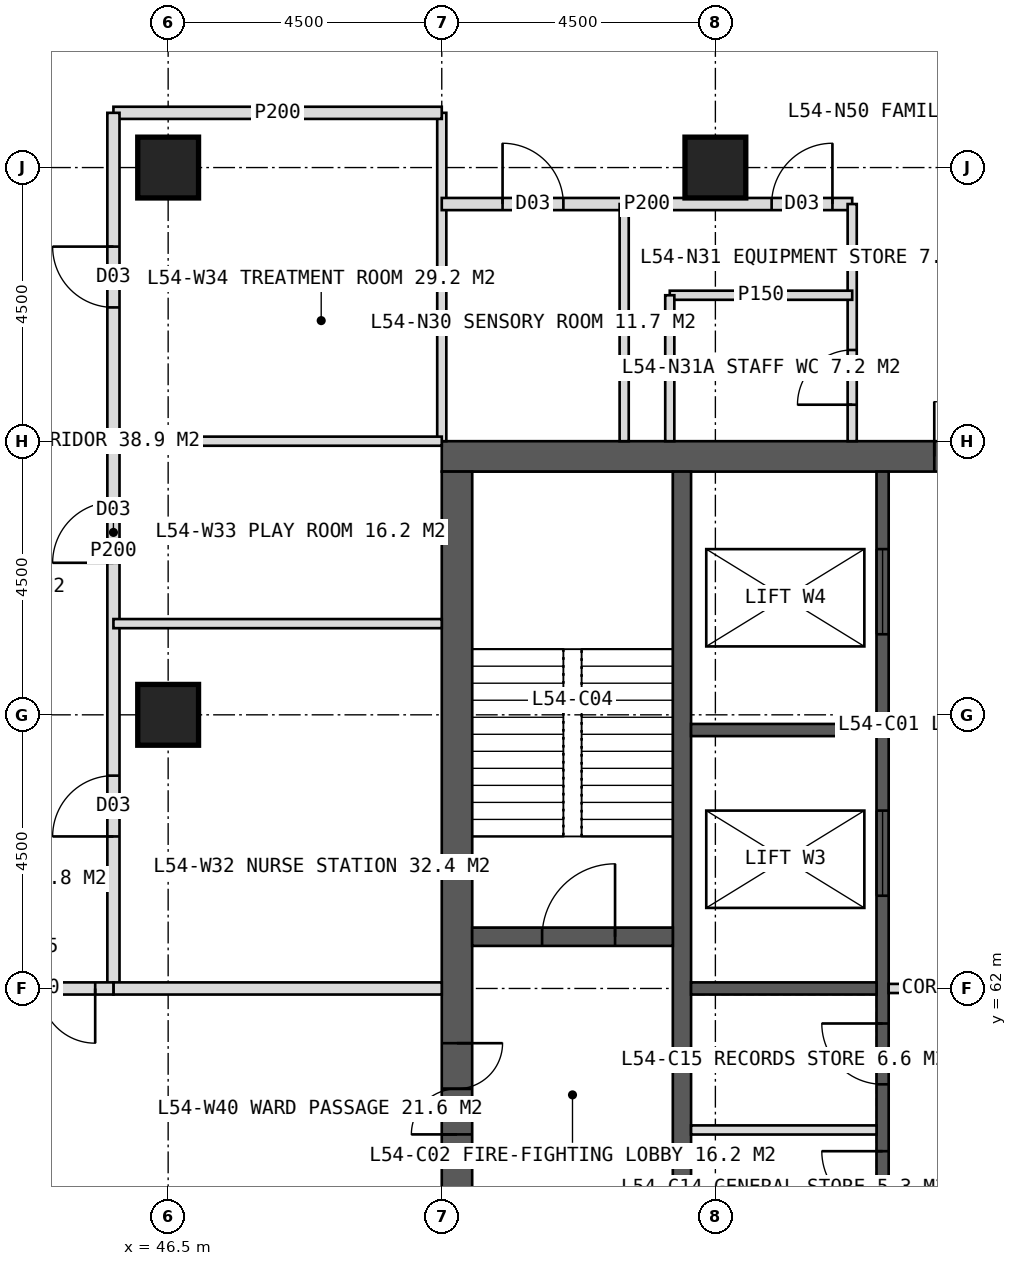
"""IFC4 building model, lengths in metres.
Left out: names, types, materials, properties, quantities, classifications, styles, units other than length and angle.
Written with IfcOpenShell. Run it as: python <this file> out.ifc"""

import sys

from ifc_helpers import new_model, si_unit, direction, frame, frame_2d, origin, origin_2d, place, context, subcontext, project, spatial, rectangle, hollow_rectangle, extrude, element, fill, save


model = new_model("IFC4")
c1 = context("Model", 3, precision=1e-05, world=origin(), true_north=direction((0.0, 1.0)))
c2 = subcontext(c1, "Body", "Model", "MODEL_VIEW")
j1 = project(units=[si_unit("LENGTHUNIT", "METRE"), si_unit("PLANEANGLEUNIT", "RADIAN")], contexts=[c1])
p1 = place(None, origin())
s1 = spatial("IfcSite", under=j1, at=p1, CompositionType="ELEMENT")
p2 = place(p1, origin())
s2 = spatial("IfcBuilding", under=s1, at=p2, CompositionType="ELEMENT")
p3 = place(p2, frame((0.0, 0.0, 225.0)))
s3 = spatial("IfcBuildingStorey", under=s2, at=p3, CompositionType="ELEMENT", Elevation=225.0)
p4 = place(p3, frame((51.0, 70.75, 0.0), z_axis=(0.0, 0.0, 1.0), x_axis=(1.0, 0.0, 0.0)))
e1 = element("IfcWall", 1, at=p4, inside=s3, PredefinedType="SHEAR", context=c2, shape_type="SweptSolid", body=[
    extrude(rectangle(XDim=18.0, YDim=0.5, at=frame_2d((9.0, 0.0))), origin(), (0.0, 0.0, 1.0), 4.0),
])
p5 = place(p4, frame((8.1, 0.0, 0.0)))
e2 = element("IfcOpeningElement", 2, at=p5, cuts=e1, PredefinedType="OPENING", context=c2, shape_type="SweptSolid", body=[
    extrude(rectangle(XDim=1.8, YDim=2.2, at=frame_2d((0.9, 1.1))), frame((0.0, 0.26, 0.0), z_axis=(0.0, -1.0, 0.0), x_axis=(1.0, 0.0, 0.0)), (0.0, 0.0, 1.0), 0.52),
])
p6 = place(p3, frame((51.25, 53.5, 0.0), z_axis=(0.0, 0.0, 1.0), x_axis=(0.0, 1.0, 0.0)))
e3 = element("IfcWall", 3, at=p6, inside=s3, PredefinedType="SHEAR", context=c2, shape_type="SweptSolid", body=[
    extrude(rectangle(XDim=17.0, YDim=0.5, at=frame_2d((8.5, 0.0))), origin(), (0.0, 0.0, 1.0), 4.0),
])
p7 = place(p6, frame((6.1, 0.0, 0.0)))
e4 = element("IfcOpeningElement", 4, at=p7, cuts=e3, PredefinedType="OPENING", context=c2, shape_type="SweptSolid", body=[
    extrude(rectangle(XDim=1.5, YDim=2.2, at=frame_2d((0.75, 1.1))), frame((0.0, 0.26, 0.0), z_axis=(0.0, -1.0, 0.0), x_axis=(1.0, 0.0, 0.0)), (0.0, 0.0, 1.0), 0.52),
])
p8 = place(p3, frame((54.95, 53.5, 0.0), z_axis=(0.0, 0.0, 1.0), x_axis=(0.0, 1.0, 0.0)))
e5 = element("IfcWall", 5, at=p8, inside=s3, PredefinedType="SHEAR", context=c2, shape_type="SweptSolid", body=[
    extrude(rectangle(XDim=17.0, YDim=0.3, at=frame_2d((8.5, 0.0))), origin(), (0.0, 0.0, 1.0), 4.0),
])
p9 = place(p3, frame((58.25, 53.5, 0.0), z_axis=(0.0, 0.0, 1.0), x_axis=(0.0, 1.0, 0.0)))
e6 = element("IfcWall", 6, at=p9, inside=s3, PredefinedType="SHEAR", context=c2, shape_type="SweptSolid", body=[
    extrude(rectangle(XDim=17.0, YDim=0.2, at=frame_2d((8.5, 0.0))), origin(), (0.0, 0.0, 1.0), 4.0),
])
p10 = place(p9, frame((0.6, 0.0, 0.0)))
e7 = element("IfcOpeningElement", 7, at=p10, cuts=e6, PredefinedType="OPENING", context=c2, shape_type="SweptSolid", body=[
    extrude(rectangle(XDim=1.0, YDim=2.1, at=frame_2d((0.5, 1.05))), frame((0.0, 0.11, 0.0), z_axis=(0.0, -1.0, 0.0), x_axis=(1.0, 0.0, 0.0)), (0.0, 0.0, 1.0), 0.22),
])
p11 = place(p9, frame((2.75, 0.0, 0.0)))
e8 = element("IfcOpeningElement", 8, at=p11, cuts=e6, PredefinedType="OPENING", context=c2, shape_type="SweptSolid", body=[
    extrude(rectangle(XDim=1.0, YDim=2.1, at=frame_2d((0.5, 1.05))), frame((0.0, 0.11, 0.0), z_axis=(0.0, -1.0, 0.0), x_axis=(1.0, 0.0, 0.0)), (0.0, 0.0, 1.0), 0.22),
])
p12 = place(p9, frame((4.824, 0.0, 0.0)))
e9 = element("IfcOpeningElement", 9, at=p12, cuts=e6, PredefinedType="OPENING", context=c2, shape_type="SweptSolid", body=[
    extrude(rectangle(XDim=1.0, YDim=2.1, at=frame_2d((0.5, 1.05))), frame((0.0, 0.11, 0.0), z_axis=(0.0, -1.0, 0.0), x_axis=(1.0, 0.0, 0.0)), (0.0, 0.0, 1.0), 0.22),
])
p13 = place(p9, frame((6.924, 0.0, 0.0)))
e10 = element("IfcOpeningElement", 10, at=p13, cuts=e6, PredefinedType="OPENING", context=c2, shape_type="SweptSolid", body=[
    extrude(rectangle(XDim=1.0, YDim=2.1, at=frame_2d((0.5, 1.05))), frame((0.0, 0.11, 0.0), z_axis=(0.0, -1.0, 0.0), x_axis=(1.0, 0.0, 0.0)), (0.0, 0.0, 1.0), 0.22),
])
p14 = place(p9, frame((10.025, 0.0, 0.0)))
e11 = element("IfcOpeningElement", 11, at=p14, cuts=e6, PredefinedType="OPENING", context=c2, shape_type="SweptSolid", body=[
    extrude(rectangle(XDim=1.4, YDim=2.2, at=frame_2d((0.7, 1.1))), frame((0.0, 0.11, 0.0), z_axis=(0.0, -1.0, 0.0), x_axis=(1.0, 0.0, 0.0)), (0.0, 0.0, 1.0), 0.22),
])
p15 = place(p9, frame((14.325, 0.0, 0.0)))
e12 = element("IfcOpeningElement", 12, at=p15, cuts=e6, PredefinedType="OPENING", context=c2, shape_type="SweptSolid", body=[
    extrude(rectangle(XDim=1.4, YDim=2.2, at=frame_2d((0.7, 1.1))), frame((0.0, 0.11, 0.0), z_axis=(0.0, -1.0, 0.0), x_axis=(1.0, 0.0, 0.0)), (0.0, 0.0, 1.0), 0.22),
])
for number, where, z_axis, x_axis in (
    (13, (55.1, 62.0, 0.0), (0.0, 0.0, 1.0), (1.0, 0.0, 0.0)),
    (14, (55.1, 66.25, 0.0), (0.0, 0.0, 1.0), (1.0, 0.0, 0.0)),
):
    element("IfcWall", number, at=place(p3, frame(where, z_axis=z_axis, x_axis=x_axis)), inside=s3, PredefinedType="SHEAR", context=c2, shape_type="SweptSolid", body=[
        extrude(rectangle(XDim=3.05, YDim=0.2, at=frame_2d((1.525, 0.0))), origin(), (0.0, 0.0, 1.0), 4.0),
    ])
p16 = place(p3, frame((51.5, 62.85, 0.0), z_axis=(0.0, 0.0, 1.0), x_axis=(1.0, 0.0, 0.0)))
e15 = element("IfcWall", 15, at=p16, inside=s3, PredefinedType="SHEAR", context=c2, shape_type="SweptSolid", body=[
    extrude(rectangle(XDim=3.3, YDim=0.3, at=frame_2d((1.65, 0.0))), origin(), (0.0, 0.0, 1.0), 4.0),
])
p17 = place(p16, frame((1.15, 0.0, 0.0)))
e16 = element("IfcOpeningElement", 16, at=p17, cuts=e15, PredefinedType="OPENING", context=c2, shape_type="SweptSolid", body=[
    extrude(rectangle(XDim=1.2, YDim=2.1, at=frame_2d((0.6, 1.05))), frame((0.0, 0.16, 0.0), z_axis=(0.0, -1.0, 0.0), x_axis=(1.0, 0.0, 0.0)), (0.0, 0.0, 1.0), 0.32),
])
for number, where, z_axis, x_axis in (
    (17, (46.5, 75.5, 0.0), (0.0, 0.0, 1.0), (1.0, 0.0, 0.0)),
    (18, (55.5, 75.5, 0.0), (0.0, 0.0, 1.0), (1.0, 0.0, 0.0)),
    (19, (46.5, 66.5, 0.0), (0.0, 0.0, 1.0), (1.0, 0.0, 0.0)),
):
    element("IfcColumn", number, at=place(p3, frame(where, z_axis=z_axis, x_axis=x_axis)), inside=s3, PredefinedType="COLUMN", context=c2, shape_type="SweptSolid", body=[
        extrude(hollow_rectangle(XDim=1.0, YDim=1.0, WallThickness=0.1, at=origin_2d()), origin(), (0.0, 0.0, 1.0), 4.0),
    ])
p18 = place(p3, frame((51.0, 71.0, 0.0), z_axis=(0.0, 0.0, 1.0), x_axis=(0.0, 1.0, 0.0)))
e20 = element("IfcWall", 20, at=p18, inside=s3, PredefinedType="PARTITIONING", context=c2, shape_type="SweptSolid", body=[
    extrude(rectangle(XDim=5.4, YDim=0.15, at=frame_2d((2.7, 0.0))), origin(), (0.0, 0.0, 1.0), 3.75),
])
p19 = place(p3, frame((45.6, 76.4, 0.0), z_axis=(0.0, 0.0, 1.0), x_axis=(1.0, 0.0, 0.0)))
e21 = element("IfcWall", 21, at=p19, inside=s3, PredefinedType="PARTITIONING", context=c2, shape_type="SweptSolid", body=[
    extrude(rectangle(XDim=5.4, YDim=0.2, at=frame_2d((2.7, 0.0))), origin(), (0.0, 0.0, 1.0), 3.75),
])
p20 = place(p3, frame((51.0, 74.9, 0.0), z_axis=(0.0, 0.0, 1.0), x_axis=(1.0, 0.0, 0.0)))
e22 = element("IfcWall", 22, at=p20, inside=s3, PredefinedType="PARTITIONING", context=c2, shape_type="SweptSolid", body=[
    extrude(rectangle(XDim=6.75, YDim=0.2, at=frame_2d((3.375, 0.0))), origin(), (0.0, 0.0, 1.0), 3.75),
])
p21 = place(p20, frame((1.0, 0.0, 0.0)))
e23 = element("IfcOpeningElement", 23, at=p21, cuts=e22, PredefinedType="OPENING", context=c2, shape_type="SweptSolid", body=[
    extrude(rectangle(XDim=1.0, YDim=2.1, at=frame_2d((0.5, 1.05))), frame((0.0, 0.11, 0.0), z_axis=(0.0, -1.0, 0.0), x_axis=(1.0, 0.0, 0.0)), (0.0, 0.0, 1.0), 0.22),
])
p22 = place(p20, frame((5.425, 0.0, 0.0)))
e24 = element("IfcOpeningElement", 24, at=p22, cuts=e22, PredefinedType="OPENING", context=c2, shape_type="SweptSolid", body=[
    extrude(rectangle(XDim=1.0, YDim=2.1, at=frame_2d((0.5, 1.05))), frame((0.0, 0.11, 0.0), z_axis=(0.0, -1.0, 0.0), x_axis=(1.0, 0.0, 0.0)), (0.0, 0.0, 1.0), 0.22),
])
p23 = place(p3, frame((57.75, 71.0, 0.0), z_axis=(0.0, 0.0, 1.0), x_axis=(0.0, 1.0, 0.0)))
e25 = element("IfcWall", 25, at=p23, inside=s3, PredefinedType="PARTITIONING", context=c2, shape_type="SweptSolid", body=[
    extrude(rectangle(XDim=3.9, YDim=0.15, at=frame_2d((1.95, 0.0))), origin(), (0.0, 0.0, 1.0), 3.75),
])
p24 = place(p23, frame((0.6, 0.0, 0.0)))
e26 = element("IfcOpeningElement", 26, at=p24, cuts=e25, PredefinedType="OPENING", context=c2, shape_type="SweptSolid", body=[
    extrude(rectangle(XDim=0.9, YDim=2.1, at=frame_2d((0.45, 1.05))), frame((0.0, 0.085, 0.0), z_axis=(0.0, -1.0, 0.0), x_axis=(1.0, 0.0, 0.0)), (0.0, 0.0, 1.0), 0.17),
])
p25 = place(p3, frame((54.0, 71.0, 0.0), z_axis=(0.0, 0.0, 1.0), x_axis=(0.0, 1.0, 0.0)))
e27 = element("IfcWall", 27, at=p25, inside=s3, PredefinedType="PARTITIONING", context=c2, shape_type="SweptSolid", body=[
    extrude(rectangle(XDim=3.9, YDim=0.15, at=frame_2d((1.95, 0.0))), origin(), (0.0, 0.0, 1.0), 3.75),
])
p26 = place(p3, frame((54.75, 73.4, 0.0), z_axis=(0.0, 0.0, 1.0), x_axis=(1.0, 0.0, 0.0)))
e28 = element("IfcWall", 28, at=p26, inside=s3, PredefinedType="PARTITIONING", context=c2, shape_type="SweptSolid", body=[
    extrude(rectangle(XDim=3.0, YDim=0.15, at=frame_2d((1.5, 0.0))), origin(), (0.0, 0.0, 1.0), 3.75),
])
p27 = place(p3, frame((54.75, 71.0, 0.0), z_axis=(0.0, 0.0, 1.0), x_axis=(0.0, 1.0, 0.0)))
e29 = element("IfcWall", 29, at=p27, inside=s3, PredefinedType="PARTITIONING", context=c2, shape_type="SweptSolid", body=[
    extrude(rectangle(XDim=2.4, YDim=0.15, at=frame_2d((1.2, 0.0))), origin(), (0.0, 0.0, 1.0), 3.75),
])
p28 = place(p3, frame((45.6, 62.0, 0.0), z_axis=(0.0, 0.0, 1.0), x_axis=(0.0, 1.0, 0.0)))
e30 = element("IfcWall", 30, at=p28, inside=s3, PredefinedType="PARTITIONING", context=c2, shape_type="SweptSolid", body=[
    extrude(rectangle(XDim=14.4, YDim=0.2, at=frame_2d((7.2, 0.0))), origin(), (0.0, 0.0, 1.0), 3.75),
])
p29 = place(p28, frame((2.5, 0.0, 0.0)))
e31 = element("IfcOpeningElement", 31, at=p29, cuts=e30, PredefinedType="OPENING", context=c2, shape_type="SweptSolid", body=[
    extrude(rectangle(XDim=1.0, YDim=2.1, at=frame_2d((0.5, 1.05))), frame((0.0, 0.11, 0.0), z_axis=(0.0, -1.0, 0.0), x_axis=(1.0, 0.0, 0.0)), (0.0, 0.0, 1.0), 0.22),
])
p30 = place(p28, frame((7.0, 0.0, 0.0)))
e32 = element("IfcOpeningElement", 32, at=p30, cuts=e30, PredefinedType="OPENING", context=c2, shape_type="SweptSolid", body=[
    extrude(rectangle(XDim=1.0, YDim=2.1, at=frame_2d((0.5, 1.05))), frame((0.0, 0.11, 0.0), z_axis=(0.0, -1.0, 0.0), x_axis=(1.0, 0.0, 0.0)), (0.0, 0.0, 1.0), 0.22),
])
p31 = place(p28, frame((11.2, 0.0, 0.0)))
e33 = element("IfcOpeningElement", 33, at=p31, cuts=e30, PredefinedType="OPENING", context=c2, shape_type="SweptSolid", body=[
    extrude(rectangle(XDim=1.0, YDim=2.1, at=frame_2d((0.5, 1.05))), frame((0.0, 0.11, 0.0), z_axis=(0.0, -1.0, 0.0), x_axis=(1.0, 0.0, 0.0)), (0.0, 0.0, 1.0), 0.22),
])
p32 = place(p3, frame((51.0, 62.0, 0.0), z_axis=(0.0, 0.0, 1.0), x_axis=(-1.0, 0.0, 0.0)))
e34 = element("IfcWall", 34, at=p32, inside=s3, PredefinedType="SOLIDWALL", context=c2, shape_type="SweptSolid", body=[
    extrude(rectangle(XDim=5.4, YDim=0.2, at=frame_2d((2.7, 0.0))), origin(), (0.0, 0.0, 1.0), 2.95),
])
for number, where, z_axis, x_axis in (
    (35, (51.0, 68.0, 0.0), (0.0, 0.0, 1.0), (-1.0, 0.0, 0.0)),
    (36, (51.0, 71.0, 0.0), (0.0, 0.0, 1.0), (-1.0, 0.0, 0.0)),
):
    element("IfcWall", number, at=place(p3, frame(where, z_axis=z_axis, x_axis=x_axis)), inside=s3, PredefinedType="PARTITIONING", context=c2, shape_type="SweptSolid", body=[
        extrude(rectangle(XDim=5.4, YDim=0.15, at=frame_2d((2.7, 0.0))), origin(), (0.0, 0.0, 1.0), 3.75),
    ])
p33 = place(p3, frame((45.6, 62.0, 0.0), z_axis=(0.0, 0.0, 1.0), x_axis=(-1.0, 0.0, 0.0)))
e37 = element("IfcWall", 37, at=p33, inside=s3, PredefinedType="SOLIDWALL", context=c2, shape_type="SweptSolid", body=[
    extrude(rectangle(XDim=2.7, YDim=0.2, at=frame_2d((1.35, 0.0))), origin(), (0.0, 0.0, 1.0), 2.95),
])
p34 = place(p33, frame((0.3, 0.0, 0.0)))
e38 = element("IfcOpeningElement", 38, at=p34, cuts=e37, PredefinedType="OPENING", context=c2, shape_type="SweptSolid", body=[
    extrude(rectangle(XDim=1.8, YDim=2.2, at=frame_2d((0.9, 1.1))), frame((0.0, 0.11, 0.0), z_axis=(0.0, -1.0, 0.0), x_axis=(1.0, 0.0, 0.0)), (0.0, 0.0, 1.0), 0.22),
])
p35 = place(p3, frame((55.1, 59.673, 0.0), z_axis=(0.0, 0.0, 1.0), x_axis=(1.0, 0.0, 0.0)))
e39 = element("IfcWall", 39, at=p35, inside=s3, PredefinedType="PARTITIONING", context=c2, shape_type="SweptSolid", body=[
    extrude(rectangle(XDim=3.05, YDim=0.15, at=frame_2d((1.525, 0.0))), origin(), (0.0, 0.0, 1.0), 3.75),
])
p36 = place(p3, frame((58.35, 62.0, 0.0), z_axis=(0.0, 0.0, 1.0), x_axis=(1.0, 0.0, 0.0)))
e40 = element("IfcWall", 40, at=p36, inside=s3, PredefinedType="PARTITIONING", context=c2, shape_type="SweptSolid", body=[
    extrude(rectangle(XDim=3.3, YDim=0.15, at=frame_2d((1.65, 0.0))), origin(), (0.0, 0.0, 1.0), 3.75),
])
p37 = place(p21, origin())
e41 = element("IfcDoor", 41, at=p37, inside=s3, OperationType="SINGLE_SWING_LEFT", PredefinedType="DOOR", context=c2, shape_type="SweptSolid", body=[
    extrude(rectangle(XDim=1.0, YDim=2.1, at=frame_2d((0.5, 1.05))), frame((0.0, 0.025, 0.0), z_axis=(0.0, -1.0, 0.0), x_axis=(1.0, 0.0, 0.0)), (0.0, 0.0, 1.0), 0.05),
])
fill(e23, e41)
p38 = place(p24, origin())
e42 = element("IfcDoor", 42, at=p38, inside=s3, OperationType="SINGLE_SWING_LEFT", PredefinedType="DOOR", context=c2, shape_type="SweptSolid", body=[
    extrude(rectangle(XDim=0.9, YDim=2.1, at=frame_2d((0.45, 1.05))), frame((0.0, 0.025, 0.0), z_axis=(0.0, -1.0, 0.0), x_axis=(1.0, 0.0, 0.0)), (0.0, 0.0, 1.0), 0.05),
])
fill(e26, e42)
p39 = place(p22, origin())
e43 = element("IfcDoor", 43, at=p39, inside=s3, OperationType="SINGLE_SWING_RIGHT", PredefinedType="DOOR", context=c2, shape_type="SweptSolid", body=[
    extrude(rectangle(XDim=1.0, YDim=2.1, at=frame_2d((0.5, 1.05))), frame((0.0, 0.025, 0.0), z_axis=(0.0, -1.0, 0.0), x_axis=(1.0, 0.0, 0.0)), (0.0, 0.0, 1.0), 0.05),
])
fill(e24, e43)
p40 = place(p29, origin())
e44 = element("IfcDoor", 44, at=p40, inside=s3, OperationType="SINGLE_SWING_LEFT", PredefinedType="DOOR", context=c2, shape_type="SweptSolid", body=[
    extrude(rectangle(XDim=1.0, YDim=2.1, at=frame_2d((0.5, 1.05))), frame((0.0, 0.025, 0.0), z_axis=(0.0, -1.0, 0.0), x_axis=(1.0, 0.0, 0.0)), (0.0, 0.0, 1.0), 0.05),
])
fill(e31, e44)
p41 = place(p30, origin())
e45 = element("IfcDoor", 45, at=p41, inside=s3, OperationType="SINGLE_SWING_LEFT", PredefinedType="DOOR", context=c2, shape_type="SweptSolid", body=[
    extrude(rectangle(XDim=1.0, YDim=2.1, at=frame_2d((0.5, 1.05))), frame((0.0, 0.025, 0.0), z_axis=(0.0, -1.0, 0.0), x_axis=(1.0, 0.0, 0.0)), (0.0, 0.0, 1.0), 0.05),
])
fill(e32, e45)
p42 = place(p31, origin())
e46 = element("IfcDoor", 46, at=p42, inside=s3, OperationType="SINGLE_SWING_RIGHT", PredefinedType="DOOR", context=c2, shape_type="SweptSolid", body=[
    extrude(rectangle(XDim=1.0, YDim=2.1, at=frame_2d((0.5, 1.05))), frame((0.0, 0.025, 0.0), z_axis=(0.0, -1.0, 0.0), x_axis=(1.0, 0.0, 0.0)), (0.0, 0.0, 1.0), 0.05),
])
fill(e33, e46)
p43 = place(p34, origin())
e47 = element("IfcDoor", 47, at=p43, inside=s3, OperationType="DOUBLE_DOOR_DOUBLE_SWING", PredefinedType="DOOR", context=c2, shape_type="SweptSolid", body=[
    extrude(rectangle(XDim=1.8, YDim=2.2, at=frame_2d((0.9, 1.1))), frame((0.0, 0.025, 0.0), z_axis=(0.0, -1.0, 0.0), x_axis=(1.0, 0.0, 0.0)), (0.0, 0.0, 1.0), 0.05),
])
fill(e38, e47)
p44 = place(p5, origin())
e48 = element("IfcDoor", 48, at=p44, inside=s3, OperationType="DOUBLE_DOOR_SINGLE_SWING", PredefinedType="DOOR", context=c2, shape_type="SweptSolid", body=[
    extrude(rectangle(XDim=1.8, YDim=2.2, at=frame_2d((0.9, 1.1))), frame((0.0, 0.025, 0.0), z_axis=(0.0, -1.0, 0.0), x_axis=(1.0, 0.0, 0.0)), (0.0, 0.0, 1.0), 0.05),
])
fill(e2, e48)
p45 = place(p7, origin())
e49 = element("IfcDoor", 49, at=p45, inside=s3, OperationType="DOUBLE_DOOR_SINGLE_SWING", PredefinedType="DOOR", context=c2, shape_type="SweptSolid", body=[
    extrude(rectangle(XDim=1.5, YDim=2.2, at=frame_2d((0.75, 1.1))), frame((0.0, 0.025, 0.0), z_axis=(0.0, -1.0, 0.0), x_axis=(1.0, 0.0, 0.0)), (0.0, 0.0, 1.0), 0.05),
])
fill(e4, e49)
p46 = place(p17, origin())
e50 = element("IfcDoor", 50, at=p46, inside=s3, OperationType="SINGLE_SWING_RIGHT", PredefinedType="DOOR", context=c2, shape_type="SweptSolid", body=[
    extrude(rectangle(XDim=1.2, YDim=2.1, at=frame_2d((0.6, 1.05))), frame((0.0, 0.025, 0.0), z_axis=(0.0, -1.0, 0.0), x_axis=(1.0, 0.0, 0.0)), (0.0, 0.0, 1.0), 0.05),
])
fill(e16, e50)
p47 = place(p12, origin())
e51 = element("IfcDoor", 51, at=p47, inside=s3, OperationType="SINGLE_SWING_RIGHT", PredefinedType="DOOR", context=c2, shape_type="SweptSolid", body=[
    extrude(rectangle(XDim=1.0, YDim=2.1, at=frame_2d((0.5, 1.05))), frame((0.0, 0.025, 0.0), z_axis=(0.0, -1.0, 0.0), x_axis=(1.0, 0.0, 0.0)), (0.0, 0.0, 1.0), 0.05),
])
fill(e9, e51)
p48 = place(p13, origin())
e52 = element("IfcDoor", 52, at=p48, inside=s3, OperationType="SINGLE_SWING_RIGHT", PredefinedType="DOOR", context=c2, shape_type="SweptSolid", body=[
    extrude(rectangle(XDim=1.0, YDim=2.1, at=frame_2d((0.5, 1.05))), frame((0.0, 0.025, 0.0), z_axis=(0.0, -1.0, 0.0), x_axis=(1.0, 0.0, 0.0)), (0.0, 0.0, 1.0), 0.05),
])
fill(e10, e52)
p49 = place(p14, origin())
e53 = element("IfcDoor", 53, at=p49, inside=s3, OperationType="SLIDING_TO_LEFT", PredefinedType="DOOR", context=c2, shape_type="SweptSolid", body=[
    extrude(rectangle(XDim=1.4, YDim=2.2, at=frame_2d((0.7, 1.1))), frame((0.0, 0.025, 0.0), z_axis=(0.0, -1.0, 0.0), x_axis=(1.0, 0.0, 0.0)), (0.0, 0.0, 1.0), 0.05),
])
fill(e11, e53)
p50 = place(p15, origin())
e54 = element("IfcDoor", 54, at=p50, inside=s3, OperationType="SLIDING_TO_LEFT", PredefinedType="DOOR", context=c2, shape_type="SweptSolid", body=[
    extrude(rectangle(XDim=1.4, YDim=2.2, at=frame_2d((0.7, 1.1))), frame((0.0, 0.025, 0.0), z_axis=(0.0, -1.0, 0.0), x_axis=(1.0, 0.0, 0.0)), (0.0, 0.0, 1.0), 0.05),
])
fill(e12, e54)
save(model, sys.argv[1])
